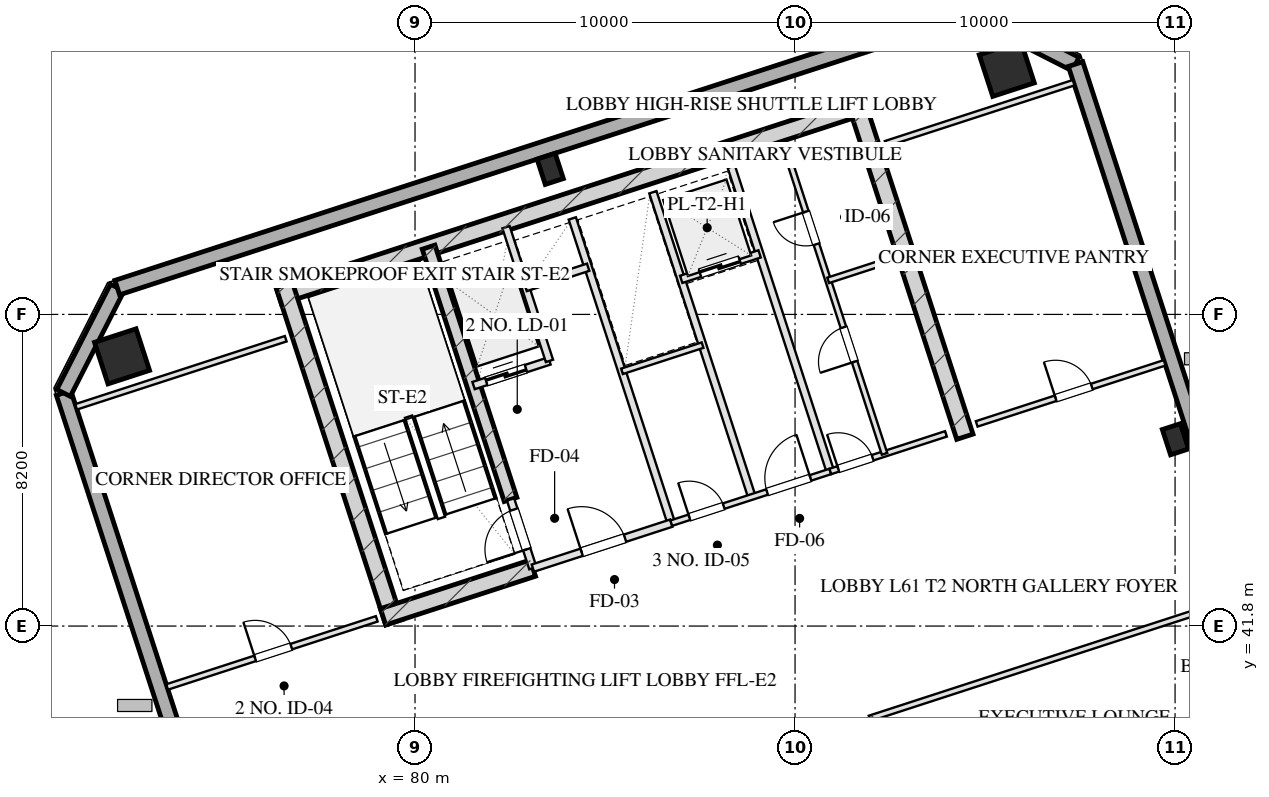
"""IFC4 building model, lengths in metres.
Left out: names, types, materials, properties, quantities, classifications, styles, units other than length and angle.
Written with IfcOpenShell. Run it as: python <this file> out.ifc"""

import sys

from ifc_helpers import new_model, si_unit, direction, frame, frame_2d, origin, origin_2d, place, context, subcontext, project, spatial, rectangle, hollow_rectangle, extrude, element, fill, save


model = new_model("IFC4")
c1 = context("Model", 3, precision=1e-05, world=origin(), true_north=direction((0.0, 1.0)))
c2 = subcontext(c1, "Body", "Model", "MODEL_VIEW")
j1 = project(units=[si_unit("LENGTHUNIT", "METRE"), si_unit("PLANEANGLEUNIT", "RADIAN")], contexts=[c1])
p1 = place(None, origin())
s1 = spatial("IfcSite", under=j1, at=p1, CompositionType="ELEMENT")
p2 = place(p1, origin())
s2 = spatial("IfcBuilding", under=s1, at=p2, CompositionType="ELEMENT")
p3 = place(p2, frame((0.0, 0.0, 226.55)))
s3 = spatial("IfcBuildingStorey", under=s2, at=p3, CompositionType="ELEMENT", Elevation=226.55)
p4 = place(p3, frame((76.415, 50.489, 0.0), z_axis=(0.0, 0.0, 1.0), x_axis=(0.951056810414, 0.309016089169, 0.0)))
e1 = element("IfcWall", 1, at=p4, inside=s3, PredefinedType="SHEAR", context=c2, shape_type="SweptSolid", body=[
    extrude(rectangle(XDim=16.25, YDim=0.45, at=frame_2d((8.125, 0.0))), origin(), (0.0, 0.0, 1.0), 3.45),
])
for number, where, z_axis, x_axis in (
    (2, (79.442, 41.899, 0.0), (0.0, 0.0, 1.0), (-0.309, 0.951, 0.0)),
    (3, (94.469, 46.781, 0.0), (0.0, 0.0, 1.0), (-0.309, 0.951, 0.0)),
):
    element("IfcWall", number, at=place(p3, frame(where, z_axis=z_axis, x_axis=x_axis)), inside=s3, PredefinedType="SHEAR", context=c2, shape_type="SweptSolid", body=[
        extrude(rectangle(XDim=9.33, YDim=0.45, at=frame_2d((4.665, 0.0))), origin(), (0.0, 0.0, 1.0), 3.45),
    ])
p5 = place(p3, frame((82.514, 45.131, 0.0), z_axis=(0.0, 0.0, 1.0), x_axis=(-0.308988790936, 0.951065679686, 0.0)))
e4 = element("IfcWall", 4, at=p5, inside=s3, PredefinedType="SHEAR", context=c2, shape_type="SweptSolid", body=[
    extrude(rectangle(XDim=6.98, YDim=0.35, at=frame_2d((3.49, 0.0))), origin(), (0.0, 0.0, 1.0), 3.45),
])
p6 = place(p3, frame((79.159, 42.043, 0.0), z_axis=(0.0, 0.0, 1.0), x_axis=(0.951047485828, 0.309044785913, 0.0)))
e5 = element("IfcWall", 5, at=p6, inside=s3, PredefinedType="SHEAR", context=c2, shape_type="SweptSolid", body=[
    extrude(rectangle(XDim=4.145, YDim=0.45, at=frame_2d((2.073, 0.0))), origin(), (0.0, 0.0, 1.0), 3.45),
])
for number, where, z_axis, x_axis in (
    (6, (95.572, 56.461, 0.0), (0.0, 0.0, 1.0), (0.951, 0.309, 0.0)),
    (7, (72.29, 48.896, 0.0), (0.0, 0.0, 1.0), (0.951, 0.309, 0.0)),
):
    element("IfcColumn", number, at=place(p3, frame(where, z_axis=z_axis, x_axis=x_axis)), inside=s3, PredefinedType="COLUMN", context=c2, shape_type="SweptSolid", body=[
        extrude(hollow_rectangle(XDim=1.15, YDim=1.15, WallThickness=0.04, at=origin_2d()), origin(), (0.0, 0.0, 1.0), 3.451),
    ])
for number, where, z_axis, x_axis in (
    (8, (100.01, 46.716, 0.0), (0.0, 0.0, 1.0), (0.951, 0.309, 0.0)),
    (9, (83.557, 53.83, 0.0), (0.0, 0.0, 1.0), (0.951, 0.309, 0.0)),
):
    element("IfcColumn", number, at=place(p3, frame(where, z_axis=z_axis, x_axis=x_axis)), inside=s3, PredefinedType="COLUMN", context=c2, shape_type="SweptSolid", body=[
        extrude(hollow_rectangle(XDim=0.5, YDim=0.7, WallThickness=0.025, at=origin_2d()), origin(), (0.0, 0.0, 1.0), 3.451),
    ])
p7 = place(p3, frame((82.618, 11.414, 0.0), z_axis=(0.0, 0.0, 1.0), x_axis=(-0.309016491071, 0.951056679828, 0.0)))
e10 = element("IfcWall", 10, at=p7, inside=s3, PredefinedType="SOLIDWALL", context=c2, shape_type="SweptSolid", body=[
    extrude(rectangle(XDim=38.4, YDim=0.4, at=frame_2d((19.2, 0.0))), origin(), (0.0, 0.0, 1.0), 2.55),
])
p8 = place(p7, frame((11.825, 0.0, 0.75)))
e11 = element("IfcOpeningElement", 11, at=p8, cuts=e10, PredefinedType="OPENING", context=c2, shape_type="SweptSolid", body=[
    extrude(rectangle(XDim=1.95, YDim=1.4, at=frame_2d((0.975, 0.7))), frame((0.0, 0.21, 0.0), z_axis=(0.0, -1.0, 0.0), x_axis=(1.0, 0.0, 0.0)), (0.0, 0.0, 1.0), 0.42),
])
p9 = place(p7, frame((15.625, 0.0, 0.75)))
e12 = element("IfcOpeningElement", 12, at=p9, cuts=e10, PredefinedType="OPENING", context=c2, shape_type="SweptSolid", body=[
    extrude(rectangle(XDim=1.95, YDim=1.4, at=frame_2d((0.975, 0.7))), frame((0.0, 0.21, 0.0), z_axis=(0.0, -1.0, 0.0), x_axis=(1.0, 0.0, 0.0)), (0.0, 0.0, 1.0), 0.42),
])
p10 = place(p7, frame((21.5, 0.0, 0.0)))
e13 = element("IfcOpeningElement", 13, at=p10, cuts=e10, PredefinedType="OPENING", context=c2, shape_type="SweptSolid", body=[
    extrude(rectangle(XDim=1.1, YDim=2.15, at=frame_2d((0.55, 1.075))), frame((0.0, 0.21, 0.0), z_axis=(0.0, -1.0, 0.0), x_axis=(1.0, 0.0, 0.0)), (0.0, 0.0, 1.0), 0.42),
])
p11 = place(p3, frame((70.752, 47.934, 0.0), z_axis=(0.0, 0.0, 1.0), x_axis=(0.453949291228, 0.891027519774, 0.0)))
e14 = element("IfcWall", 14, at=p11, inside=s3, PredefinedType="SOLIDWALL", context=c2, shape_type="SweptSolid", body=[
    extrude(rectangle(XDim=3.111, YDim=0.4, at=frame_2d((1.556, 0.0))), origin(), (0.0, 0.0, 1.0), 2.55),
])
p12 = place(p3, frame((72.165, 50.706, 0.0), z_axis=(0.0, 0.0, 1.0), x_axis=(0.951058012937, 0.309012388148, 0.0)))
e15 = element("IfcWall", 15, at=p12, inside=s3, PredefinedType="SOLIDWALL", context=c2, shape_type="SweptSolid", body=[
    extrude(rectangle(XDim=23.6, YDim=0.4, at=frame_2d((11.8, 0.0))), origin(), (0.0, 0.0, 1.0), 2.55),
])
p13 = place(p3, frame((94.61, 57.999, 0.0), z_axis=(0.0, 0.0, 1.0), x_axis=(0.890979603174, -0.454043331334, 0.0)))
e16 = element("IfcWall", 16, at=p13, inside=s3, PredefinedType="SOLIDWALL", context=c2, shape_type="SweptSolid", body=[
    extrude(rectangle(XDim=3.111, YDim=0.4, at=frame_2d((1.556, 0.0))), origin(), (0.0, 0.0, 1.0), 2.55),
])
p14 = place(p3, frame((97.382, 56.586, 0.0), z_axis=(0.0, 0.0, 1.0), x_axis=(0.309016491071, -0.951056679828, 0.0)))
e17 = element("IfcWall", 17, at=p14, inside=s3, PredefinedType="SOLIDWALL", context=c2, shape_type="SweptSolid", body=[
    extrude(rectangle(XDim=38.4, YDim=0.4, at=frame_2d((19.2, 0.0))), origin(), (0.0, 0.0, 1.0), 2.55),
])
p15 = place(p14, frame((24.625, 0.0, 0.75)))
e18 = element("IfcOpeningElement", 18, at=p15, cuts=e17, PredefinedType="OPENING", context=c2, shape_type="SweptSolid", body=[
    extrude(rectangle(XDim=1.95, YDim=1.4, at=frame_2d((0.975, 0.7))), frame((0.0, 0.21, 0.0), z_axis=(0.0, -1.0, 0.0), x_axis=(1.0, 0.0, 0.0)), (0.0, 0.0, 1.0), 0.42),
])
p16 = place(p14, frame((20.825, 0.0, 0.75)))
e19 = element("IfcOpeningElement", 19, at=p16, cuts=e17, PredefinedType="OPENING", context=c2, shape_type="SweptSolid", body=[
    extrude(rectangle(XDim=1.95, YDim=1.4, at=frame_2d((0.975, 0.7))), frame((0.0, 0.21, 0.0), z_axis=(0.0, -1.0, 0.0), x_axis=(1.0, 0.0, 0.0)), (0.0, 0.0, 1.0), 0.42),
])
p17 = place(p14, frame((15.8, 0.0, 0.0)))
e20 = element("IfcOpeningElement", 20, at=p17, cuts=e17, PredefinedType="OPENING", context=c2, shape_type="SweptSolid", body=[
    extrude(rectangle(XDim=1.1, YDim=2.15, at=frame_2d((0.55, 1.075))), frame((0.0, 0.21, 0.0), z_axis=(0.0, -1.0, 0.0), x_axis=(1.0, 0.0, 0.0)), (0.0, 0.0, 1.0), 0.42),
])
p18 = place(p3, frame((83.101, 43.324, 0.0), z_axis=(0.0, 0.0, 1.0), x_axis=(-0.309048298632, 0.951046344356, 0.0)))
e21 = element("IfcWall", 21, at=p18, inside=s3, PredefinedType="PARTITIONING", context=c2, shape_type="SweptSolid", body=[
    extrude(rectangle(XDim=1.9, YDim=0.2, at=frame_2d((0.95, 0.0))), origin(), (0.0, 0.0, 1.0), 3.155),
])
p19 = place(p18, frame((0.52, 0.0, 0.0)))
e22 = element("IfcOpeningElement", 22, at=p19, cuts=e21, PredefinedType="OPENING", context=c2, shape_type="SweptSolid", body=[
    extrude(rectangle(XDim=1.1, YDim=2.05, at=frame_2d((0.55, 1.025))), frame((0.0, 0.11, 0.0), z_axis=(0.0, -1.0, 0.0), x_axis=(1.0, 0.0, 0.0)), (0.0, 0.0, 1.0), 0.22),
])
p20 = place(p3, frame((86.743, 44.508, 0.0), z_axis=(0.0, 0.0, 1.0), x_axis=(-0.309016001439, 0.951056838919, 0.0)))
e23 = element("IfcWall", 23, at=p20, inside=s3, PredefinedType="PARTITIONING", context=c2, shape_type="SweptSolid", body=[
    extrude(rectangle(XDim=8.43, YDim=0.2, at=frame_2d((4.215, 0.0))), origin(), (0.0, 0.0, 1.0), 3.155),
])
p21 = place(p3, frame((83.101, 43.324, 0.0), z_axis=(0.0, 0.0, 1.0), x_axis=(0.951052804469, 0.309028417967, 0.0)))
e24 = element("IfcWall", 24, at=p21, inside=s3, PredefinedType="PARTITIONING", context=c2, shape_type="SweptSolid", body=[
    extrude(rectangle(XDim=3.83, YDim=0.2, at=frame_2d((1.915, 0.0))), origin(), (0.0, 0.0, 1.0), 3.155),
])
p22 = place(p21, frame((1.35, 0.0, 0.0)))
e25 = element("IfcOpeningElement", 25, at=p22, cuts=e24, PredefinedType="OPENING", context=c2, shape_type="SweptSolid", body=[
    extrude(rectangle(XDim=1.2, YDim=2.05, at=frame_2d((0.6, 1.025))), frame((0.0, 0.11, 0.0), z_axis=(0.0, -1.0, 0.0), x_axis=(1.0, 0.0, 0.0)), (0.0, 0.0, 1.0), 0.22),
])
p23 = place(p3, frame((81.54, 48.127, 0.0), z_axis=(0.0, 0.0, 1.0), x_axis=(0.951062257173, 0.308999325213, 0.0)))
e26 = element("IfcWall", 26, at=p23, inside=s3, PredefinedType="PARTITIONING", context=c2, shape_type="SweptSolid", body=[
    extrude(rectangle(XDim=2.1, YDim=0.2, at=frame_2d((1.05, 0.0))), origin(), (0.0, 0.0, 1.0), 3.155),
])
p24 = place(p23, frame((0.35, 0.0, 0.0)))
e27 = element("IfcOpeningElement", 27, at=p24, cuts=e26, PredefinedType="OPENING", context=c2, shape_type="SweptSolid", body=[
    extrude(rectangle(XDim=1.1, YDim=2.05, at=frame_2d((0.55, 1.025))), frame((0.0, 0.11, 0.0), z_axis=(0.0, -1.0, 0.0), x_axis=(1.0, 0.0, 0.0)), (0.0, 0.0, 1.0), 0.22),
])
p25 = place(p3, frame((83.538, 48.776, 0.0), z_axis=(0.0, 0.0, 1.0), x_axis=(-0.3089935693, 0.951064127245, 0.0)))
e28 = element("IfcWall", 28, at=p25, inside=s3, PredefinedType="PARTITIONING", context=c2, shape_type="SweptSolid", body=[
    extrude(rectangle(XDim=3.7, YDim=0.2, at=frame_2d((1.85, 0.0))), origin(), (0.0, 0.0, 1.0), 3.155),
])
p26 = place(p3, frame((82.91, 50.707, 0.0), z_axis=(0.0, 0.0, 1.0), x_axis=(0.951041328149, 0.309063734775, 0.0)))
e29 = element("IfcWall", 29, at=p26, inside=s3, PredefinedType="PARTITIONING", context=c2, shape_type="SweptSolid", body=[
    extrude(rectangle(XDim=1.73, YDim=0.2, at=frame_2d((0.865, 0.0))), origin(), (0.0, 0.0, 1.0), 3.155),
])
p27 = place(p3, frame((90.928, 45.868, 0.0), z_axis=(0.0, 0.0, 1.0), x_axis=(-0.309042196757, 0.951048327176, 0.0)))
e30 = element("IfcWall", 30, at=p27, inside=s3, PredefinedType="PARTITIONING", context=c2, shape_type="SweptSolid", body=[
    extrude(rectangle(XDim=8.43, YDim=0.2, at=frame_2d((4.215, 0.0))), origin(), (0.0, 0.0, 1.0), 3.155),
])
p28 = place(p3, frame((88.864, 45.197, 0.0), z_axis=(0.0, 0.0, 1.0), x_axis=(-0.309007490203, 0.951059604335, 0.0)))
e31 = element("IfcWall", 31, at=p28, inside=s3, PredefinedType="PARTITIONING", context=c2, shape_type="SweptSolid", body=[
    extrude(rectangle(XDim=8.43, YDim=0.2, at=frame_2d((4.215, 0.0))), origin(), (0.0, 0.0, 1.0), 3.155),
])
p29 = place(p3, frame((86.743, 44.508, 0.0), z_axis=(0.0, 0.0, 1.0), x_axis=(0.951063829732, 0.308994485023, 0.0)))
e32 = element("IfcWall", 32, at=p29, inside=s3, PredefinedType="PARTITIONING", context=c2, shape_type="SweptSolid", body=[
    extrude(rectangle(XDim=4.4, YDim=0.15, at=frame_2d((2.2, 0.0))), origin(), (0.0, 0.0, 1.0), 3.155),
])
p30 = place(p29, frame((0.5, 0.0, 0.0)))
e33 = element("IfcOpeningElement", 33, at=p30, cuts=e32, PredefinedType="OPENING", context=c2, shape_type="SweptSolid", body=[
    extrude(rectangle(XDim=0.95, YDim=2.05, at=frame_2d((0.475, 1.025))), frame((0.0, 0.085, 0.0), z_axis=(0.0, -1.0, 0.0), x_axis=(1.0, 0.0, 0.0)), (0.0, 0.0, 1.0), 0.17),
])
p31 = place(p29, frame((2.65, 0.0, 0.0)))
e34 = element("IfcOpeningElement", 34, at=p31, cuts=e32, PredefinedType="OPENING", context=c2, shape_type="SweptSolid", body=[
    extrude(rectangle(XDim=1.2, YDim=2.05, at=frame_2d((0.6, 1.025))), frame((0.0, 0.085, 0.0), z_axis=(0.0, -1.0, 0.0), x_axis=(1.0, 0.0, 0.0)), (0.0, 0.0, 1.0), 0.17),
])
p32 = place(p3, frame((85.446, 48.502, 0.0), z_axis=(0.0, 0.0, 1.0), x_axis=(0.951075093106, 0.308959814982, 0.0)))
e35 = element("IfcWall", 35, at=p32, inside=s3, PredefinedType="PARTITIONING", context=c2, shape_type="SweptSolid", body=[
    extrude(rectangle(XDim=2.23, YDim=0.15, at=frame_2d((1.115, 0.0))), origin(), (0.0, 0.0, 1.0), 3.155),
])
p33 = place(p3, frame((87.004, 50.922, 0.0), z_axis=(0.0, 0.0, 1.0), x_axis=(0.951041509718, 0.309063176055, 0.0)))
e36 = element("IfcWall", 36, at=p33, inside=s3, PredefinedType="PARTITIONING", context=c2, shape_type="SweptSolid", body=[
    extrude(rectangle(XDim=2.17, YDim=0.2, at=frame_2d((1.085, 0.0))), origin(), (0.0, 0.0, 1.0), 3.155),
])
p34 = place(p33, frame((0.52, 0.0, 0.0)))
e37 = element("IfcOpeningElement", 37, at=p34, cuts=e36, PredefinedType="OPENING", context=c2, shape_type="SweptSolid", body=[
    extrude(rectangle(XDim=1.1, YDim=2.05, at=frame_2d((0.55, 1.025))), frame((0.0, 0.11, 0.0), z_axis=(0.0, -1.0, 0.0), x_axis=(1.0, 0.0, 0.0)), (0.0, 0.0, 1.0), 0.22),
])
p35 = place(p3, frame((90.928, 45.868, 0.0), z_axis=(0.0, 0.0, 1.0), x_axis=(0.951059297078, 0.309008435874, 0.0)))
e38 = element("IfcWall", 38, at=p35, inside=s3, PredefinedType="PARTITIONING", context=c2, shape_type="SweptSolid", body=[
    extrude(rectangle(XDim=3.2, YDim=0.15, at=frame_2d((1.6, 0.0))), origin(), (0.0, 0.0, 1.0), 3.155),
])
p36 = place(p35, frame((0.22, 0.0, 0.0)))
e39 = element("IfcOpeningElement", 39, at=p36, cuts=e38, PredefinedType="OPENING", context=c2, shape_type="SweptSolid", body=[
    extrude(rectangle(XDim=0.95, YDim=2.05, at=frame_2d((0.475, 1.025))), frame((0.0, 0.085, 0.0), z_axis=(0.0, -1.0, 0.0), x_axis=(1.0, 0.0, 0.0)), (0.0, 0.0, 1.0), 0.17),
])
p37 = place(p3, frame((92.355, 46.331, 0.0), z_axis=(0.0, 0.0, 1.0), x_axis=(-0.309007490203, 0.951059604335, 0.0)))
e40 = element("IfcWall", 40, at=p37, inside=s3, PredefinedType="PARTITIONING", context=c2, shape_type="SweptSolid", body=[
    extrude(rectangle(XDim=8.43, YDim=0.15, at=frame_2d((4.215, 0.0))), origin(), (0.0, 0.0, 1.0), 3.155),
])
p38 = place(p37, frame((2.55, 0.0, 0.0)))
e41 = element("IfcOpeningElement", 41, at=p38, cuts=e40, PredefinedType="OPENING", context=c2, shape_type="SweptSolid", body=[
    extrude(rectangle(XDim=0.95, YDim=2.05, at=frame_2d((0.475, 1.025))), frame((0.0, 0.085, 0.0), z_axis=(0.0, -1.0, 0.0), x_axis=(1.0, 0.0, 0.0)), (0.0, 0.0, 1.0), 0.17),
])
p39 = place(p37, frame((5.8, 0.0, 0.0)))
e42 = element("IfcOpeningElement", 42, at=p39, cuts=e40, PredefinedType="OPENING", context=c2, shape_type="SweptSolid", body=[
    extrude(rectangle(XDim=0.9, YDim=2.05, at=frame_2d((0.45, 1.025))), frame((0.0, 0.085, 0.0), z_axis=(0.0, -1.0, 0.0), x_axis=(1.0, 0.0, 0.0)), (0.0, 0.0, 1.0), 0.17),
])
p40 = place(p3, frame((90.871, 50.896, 0.0), z_axis=(0.0, 0.0, 1.0), x_axis=(0.951054116971, 0.309024378638, 0.0)))
e43 = element("IfcWall", 43, at=p40, inside=s3, PredefinedType="PARTITIONING", context=c2, shape_type="SweptSolid", body=[
    extrude(rectangle(XDim=1.7, YDim=0.15, at=frame_2d((0.85, 0.0))), origin(), (0.0, 0.0, 1.0), 3.155),
])
p41 = place(p3, frame((71.081, 47.568, 0.0), z_axis=(0.0, 0.0, 1.0), x_axis=(0.951059431056, 0.309008023519, 0.0)))
e44 = element("IfcWall", 44, at=p41, inside=s3, PredefinedType="PARTITIONING", context=c2, shape_type="SweptSolid", body=[
    extrude(rectangle(XDim=5.8, YDim=0.15, at=frame_2d((2.9, 0.0))), origin(), (0.0, 0.0, 1.0), 3.155),
])
p42 = place(p3, frame((73.476, 40.197, 0.0), z_axis=(0.0, 0.0, 1.0), x_axis=(0.951059431056, 0.309008023519, 0.0)))
e45 = element("IfcWall", 45, at=p42, inside=s3, PredefinedType="PARTITIONING", context=c2, shape_type="SweptSolid", body=[
    extrude(rectangle(XDim=5.8, YDim=0.15, at=frame_2d((2.9, 0.0))), origin(), (0.0, 0.0, 1.0), 3.155),
])
p43 = place(p42, frame((2.436, 0.0, 0.0)))
e46 = element("IfcOpeningElement", 46, at=p43, cuts=e45, PredefinedType="OPENING", context=c2, shape_type="SweptSolid", body=[
    extrude(rectangle(XDim=1.0, YDim=2.05, at=frame_2d((0.5, 1.025))), frame((0.0, 0.085, 0.0), z_axis=(0.0, -1.0, 0.0), x_axis=(1.0, 0.0, 0.0)), (0.0, 0.0, 1.0), 0.17),
])
p44 = place(p3, frame((92.385, 54.49, 0.0), z_axis=(0.0, 0.0, 1.0), x_axis=(0.951055112834, 0.309021313752, 0.0)))
e47 = element("IfcWall", 47, at=p44, inside=s3, PredefinedType="PARTITIONING", context=c2, shape_type="SweptSolid", body=[
    extrude(rectangle(XDim=5.2, YDim=0.15, at=frame_2d((2.6, 0.0))), origin(), (0.0, 0.0, 1.0), 3.155),
])
p45 = place(p3, frame((94.78, 47.119, 0.0), z_axis=(0.0, 0.0, 1.0), x_axis=(0.951055112834, 0.309021313752, 0.0)))
e48 = element("IfcWall", 48, at=p45, inside=s3, PredefinedType="PARTITIONING", context=c2, shape_type="SweptSolid", body=[
    extrude(rectangle(XDim=5.2, YDim=0.15, at=frame_2d((2.6, 0.0))), origin(), (0.0, 0.0, 1.0), 3.155),
])
p46 = place(p45, frame((2.184, 0.0, 0.0)))
e49 = element("IfcOpeningElement", 49, at=p46, cuts=e48, PredefinedType="OPENING", context=c2, shape_type="SweptSolid", body=[
    extrude(rectangle(XDim=1.0, YDim=2.05, at=frame_2d((0.5, 1.025))), frame((0.0, 0.085, 0.0), z_axis=(0.0, -1.0, 0.0), x_axis=(1.0, 0.0, 0.0)), (0.0, 0.0, 1.0), 0.17),
])
for number, where, z_axis, x_axis in (
    (50, (91.962, 39.369, 0.0), (0.0, 0.0, 1.0), (0.951, 0.309, 0.0)),
    (51, (92.991, 36.202, 0.0), (0.0, 0.0, 1.0), (0.951, 0.309, 0.0)),
):
    element("IfcWall", number, at=place(p3, frame(where, z_axis=z_axis, x_axis=x_axis)), inside=s3, PredefinedType="PARTITIONING", context=c2, shape_type="SweptSolid", body=[
        extrude(rectangle(XDim=10.275, YDim=0.15, at=frame_2d((5.137, 0.0))), origin(), (0.0, 0.0, 1.0), 3.155),
    ])
p47 = place(p19, origin())
e52 = element("IfcDoor", 52, at=p47, inside=s3, OperationType="SINGLE_SWING_LEFT", PredefinedType="DOOR", context=c2, shape_type="SweptSolid", body=[
    extrude(rectangle(XDim=1.1, YDim=2.05, at=frame_2d((0.55, 1.025))), frame((0.0, 0.025, 0.0), z_axis=(0.0, -1.0, 0.0), x_axis=(1.0, 0.0, 0.0)), (0.0, 0.0, 1.0), 0.05),
])
fill(e22, e52)
p48 = place(p22, origin())
e53 = element("IfcDoor", 53, at=p48, inside=s3, OperationType="SINGLE_SWING_LEFT", PredefinedType="DOOR", context=c2, shape_type="SweptSolid", body=[
    extrude(rectangle(XDim=1.2, YDim=2.05, at=frame_2d((0.6, 1.025))), frame((0.0, 0.025, 0.0), z_axis=(0.0, -1.0, 0.0), x_axis=(1.0, 0.0, 0.0)), (0.0, 0.0, 1.0), 0.05),
])
fill(e25, e53)
p49 = place(p24, origin())
e54 = element("IfcDoor", 54, at=p49, inside=s3, OperationType="DOUBLE_DOOR_SLIDING", PredefinedType="DOOR", context=c2, shape_type="SweptSolid", body=[
    extrude(rectangle(XDim=1.1, YDim=2.05, at=frame_2d((0.55, 1.025))), frame((0.0, 0.025, 0.0), z_axis=(0.0, -1.0, 0.0), x_axis=(1.0, 0.0, 0.0)), (0.0, 0.0, 1.0), 0.05),
])
fill(e27, e54)
p50 = place(p30, origin())
e55 = element("IfcDoor", 55, at=p50, inside=s3, OperationType="SINGLE_SWING_LEFT", PredefinedType="DOOR", context=c2, shape_type="SweptSolid", body=[
    extrude(rectangle(XDim=0.95, YDim=2.05, at=frame_2d((0.475, 1.025))), frame((0.0, 0.025, 0.0), z_axis=(0.0, -1.0, 0.0), x_axis=(1.0, 0.0, 0.0)), (0.0, 0.0, 1.0), 0.05),
])
fill(e33, e55)
p51 = place(p31, origin())
e56 = element("IfcDoor", 56, at=p51, inside=s3, OperationType="SINGLE_SWING_RIGHT", PredefinedType="DOOR", context=c2, shape_type="SweptSolid", body=[
    extrude(rectangle(XDim=1.2, YDim=2.05, at=frame_2d((0.6, 1.025))), frame((0.0, 0.025, 0.0), z_axis=(0.0, -1.0, 0.0), x_axis=(1.0, 0.0, 0.0)), (0.0, 0.0, 1.0), 0.05),
])
fill(e34, e56)
p52 = place(p34, origin())
e57 = element("IfcDoor", 57, at=p52, inside=s3, OperationType="DOUBLE_DOOR_SLIDING", PredefinedType="DOOR", context=c2, shape_type="SweptSolid", body=[
    extrude(rectangle(XDim=1.1, YDim=2.05, at=frame_2d((0.55, 1.025))), frame((0.0, 0.025, 0.0), z_axis=(0.0, -1.0, 0.0), x_axis=(1.0, 0.0, 0.0)), (0.0, 0.0, 1.0), 0.05),
])
fill(e37, e57)
p53 = place(p36, origin())
e58 = element("IfcDoor", 58, at=p53, inside=s3, OperationType="SINGLE_SWING_LEFT", PredefinedType="DOOR", context=c2, shape_type="SweptSolid", body=[
    extrude(rectangle(XDim=0.95, YDim=2.05, at=frame_2d((0.475, 1.025))), frame((0.0, 0.025, 0.0), z_axis=(0.0, -1.0, 0.0), x_axis=(1.0, 0.0, 0.0)), (0.0, 0.0, 1.0), 0.05),
])
fill(e39, e58)
p54 = place(p38, origin())
e59 = element("IfcDoor", 59, at=p54, inside=s3, OperationType="SINGLE_SWING_LEFT", PredefinedType="DOOR", context=c2, shape_type="SweptSolid", body=[
    extrude(rectangle(XDim=0.95, YDim=2.05, at=frame_2d((0.475, 1.025))), frame((0.0, 0.025, 0.0), z_axis=(0.0, -1.0, 0.0), x_axis=(1.0, 0.0, 0.0)), (0.0, 0.0, 1.0), 0.05),
])
fill(e41, e59)
p55 = place(p39, origin())
e60 = element("IfcDoor", 60, at=p55, inside=s3, OperationType="SINGLE_SWING_RIGHT", PredefinedType="DOOR", context=c2, shape_type="SweptSolid", body=[
    extrude(rectangle(XDim=0.9, YDim=2.05, at=frame_2d((0.45, 1.025))), frame((0.0, 0.025, 0.0), z_axis=(0.0, -1.0, 0.0), x_axis=(1.0, 0.0, 0.0)), (0.0, 0.0, 1.0), 0.05),
])
fill(e42, e60)
p56 = place(p43, origin())
e61 = element("IfcDoor", 61, at=p56, inside=s3, OperationType="SINGLE_SWING_LEFT", PredefinedType="DOOR", context=c2, shape_type="SweptSolid", body=[
    extrude(rectangle(XDim=1.0, YDim=2.05, at=frame_2d((0.5, 1.025))), frame((0.0, 0.025, 0.0), z_axis=(0.0, -1.0, 0.0), x_axis=(1.0, 0.0, 0.0)), (0.0, 0.0, 1.0), 0.05),
])
fill(e46, e61)
p57 = place(p46, origin())
e62 = element("IfcDoor", 62, at=p57, inside=s3, OperationType="SINGLE_SWING_LEFT", PredefinedType="DOOR", context=c2, shape_type="SweptSolid", body=[
    extrude(rectangle(XDim=1.0, YDim=2.05, at=frame_2d((0.5, 1.025))), frame((0.0, 0.025, 0.0), z_axis=(0.0, -1.0, 0.0), x_axis=(1.0, 0.0, 0.0)), (0.0, 0.0, 1.0), 0.05),
])
fill(e49, e62)
save(model, sys.argv[1])
